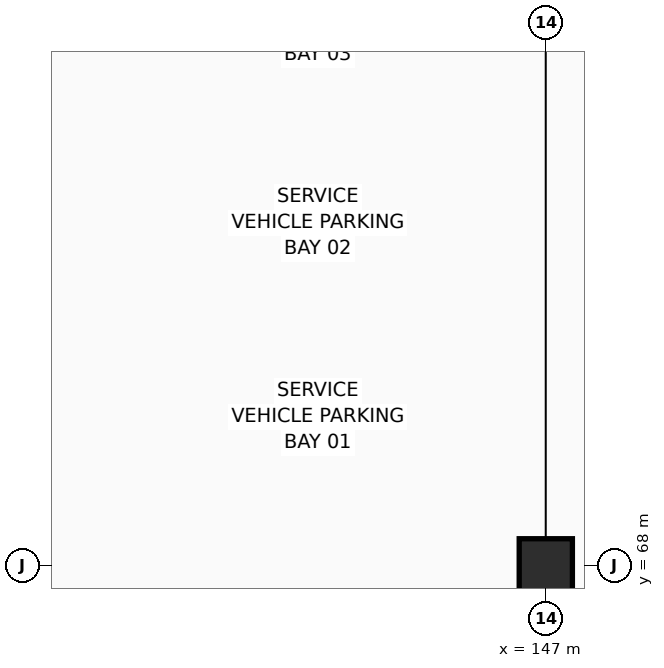
"""IFC4 building model, lengths in metres.
Left out: names, types, materials, properties, quantities, classifications, styles, units other than length and angle.
Written with IfcOpenShell. Run it as: python <this file> out.ifc"""

import sys

from ifc_helpers import new_model, si_unit, direction, frame, origin, origin_2d, place, context, subcontext, project, spatial, rectangle, extrude, element, save


model = new_model("IFC4")
c1 = context("Model", 3, precision=1e-05, world=origin(), true_north=direction((0.0, 1.0)))
c2 = subcontext(c1, "Body", "Model", "MODEL_VIEW")
j1 = project(units=[si_unit("LENGTHUNIT", "METRE"), si_unit("PLANEANGLEUNIT", "RADIAN")], contexts=[c1])
p1 = place(None, origin())
s1 = spatial("IfcSite", under=j1, at=p1, CompositionType="ELEMENT")
p2 = place(p1, origin())
s2 = spatial("IfcBuilding", under=s1, at=p2, CompositionType="ELEMENT")
p3 = place(p2, frame((0.0, 0.0, -4.5)))
s3 = spatial("IfcBuildingStorey", under=s2, at=p3, CompositionType="ELEMENT", Elevation=-4.5)
p4 = place(p3, frame((147.0, 68.0, 0.0), z_axis=(0.0, 0.0, 1.0), x_axis=(1.0, 0.0, 0.0)))
e1 = element("IfcColumn", 1, at=p4, inside=s3, PredefinedType="COLUMN", context=c2, shape_type="SweptSolid", body=[
    extrude(rectangle(XDim=0.7, YDim=0.7, at=origin_2d()), origin(), (0.0, 0.0, 1.0), 4.5),
])
save(model, sys.argv[1])
